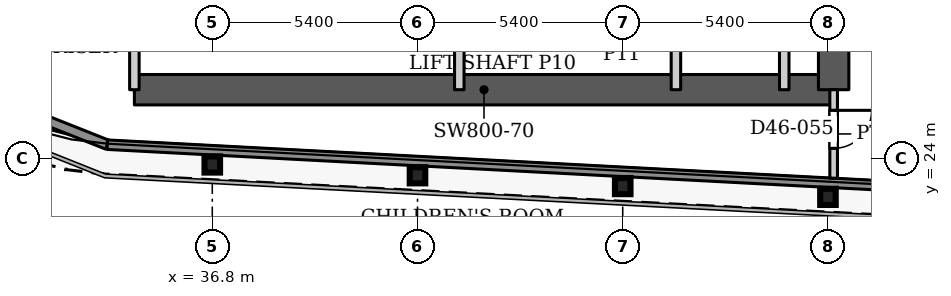
"""IFC4 building model, lengths in metres.
Left out: names, types, materials, properties, quantities, classifications, styles, units other than length and angle.
Written with IfcOpenShell. Run it as: python <this file> out.ifc"""

import sys

from ifc_helpers import new_model, si_unit, direction, frame, frame_2d, origin, origin_2d, place, context, subcontext, project, spatial, rectangle, i_section, extrude, source, transform, mapped, element, fill, save


model = new_model("IFC4")
c1 = context("Model", 3, precision=1e-05, world=origin(), true_north=direction((0.0, 1.0)))
c2 = subcontext(c1, "Body", "Model", "MODEL_VIEW")
j1 = project(units=[si_unit("LENGTHUNIT", "METRE"), si_unit("PLANEANGLEUNIT", "RADIAN")], contexts=[c1])
p1 = place(None, origin())
s1 = spatial("IfcSite", under=j1, at=p1, CompositionType="ELEMENT")
p2 = place(p1, origin())
s2 = spatial("IfcBuilding", under=s1, at=p2, CompositionType="ELEMENT")
p3 = place(p2, frame((0.0, 0.0, 195.5)))
s3 = spatial("IfcBuildingStorey", under=s2, at=p3, CompositionType="ELEMENT", Elevation=195.5)
for number, where, z_axis, x_axis in (
    (1, (53.0, 22.98, 0.0), (0.0, 0.0, 1.0), (1.0, 0.0, 0.0)),
    (2, (47.6, 23.264, 0.0), (0.0, 0.0, 1.0), (1.0, 0.0, 0.0)),
    (3, (42.2, 23.548, 0.0), (0.0, 0.0, 1.0), (1.0, 0.0, 0.0)),
    (4, (36.8, 23.832, 0.0), (0.0, 0.0, 1.0), (1.0, 0.0, 0.0)),
):
    element("IfcColumn", number, at=place(p3, frame(where, z_axis=z_axis, x_axis=x_axis)), inside=s3, PredefinedType="COLUMN", context=c2, shape_type="SweptSolid", body=[
        extrude(i_section(OverallWidth=0.409, OverallDepth=0.425, WebThickness=0.033, FlangeThickness=0.052, FilletRadius=0.013, at=origin_2d()), origin(), (0.0, 0.0, 1.0), 3.9),
    ])
p4 = place(p3, frame((34.75, 25.8, 0.0), z_axis=(0.0, 0.0, 1.0), x_axis=(1.0, 0.0, 0.0)))
e5 = element("IfcWall", 5, at=p4, inside=s3, PredefinedType="SHEAR", context=c2, shape_type="SweptSolid", body=[
    extrude(rectangle(XDim=18.4, YDim=0.8, at=frame_2d((9.2, 0.0))), origin(), (0.0, 0.0, 1.0), 3.9),
])
p5 = place(p3, frame((53.15, 25.8, 0.0), z_axis=(0.0, 0.0, 1.0), x_axis=(0.0, 1.0, 0.0)))
e6 = element("IfcWall", 6, at=p5, inside=s3, PredefinedType="SHEAR", context=c2, shape_type="SweptSolid", body=[
    extrude(rectangle(XDim=10.4, YDim=0.8, at=frame_2d((5.2, 0.0))), origin(), (0.0, 0.0, 1.0), 3.9),
])
p6 = place(p3, frame((34.039, 24.353, 0.0), z_axis=(0.0, 0.0, 1.0), x_axis=(-0.929352825399, 0.369192803184, 0.0)))
e7 = element("IfcWall", 7, at=p6, inside=s3, PredefinedType="SOLIDWALL", context=c2, shape_type="SweptSolid", body=[
    extrude(rectangle(XDim=4.656, YDim=0.25, at=frame_2d((2.328, 0.0))), origin(), (0.0, 0.0, 1.0), 3.75),
])
p7 = place(p3, frame((100.586, 20.85, 0.0), z_axis=(0.0, 0.0, 1.0), x_axis=(-0.99861746497, 0.052565755559, 0.0)))
e8 = element("IfcWall", 8, at=p7, inside=s3, PredefinedType="SOLIDWALL", context=c2, shape_type="SweptSolid", body=[
    extrude(rectangle(XDim=66.639, YDim=0.25, at=frame_2d((33.319, 0.0))), origin(), (0.0, 0.0, 1.0), 3.75),
])
for number, where, z_axis, x_axis in (
    (9, (34.75, 25.8, 0.0), (0.0, 0.0, 1.0), (0.0, 1.0, 0.0)),
    (10, (43.3, 25.8, 0.0), (0.0, 0.0, 1.0), (0.0, 1.0, 0.0)),
    (11, (49.0, 25.8, 0.0), (0.0, 0.0, 1.0), (0.0, 1.0, 0.0)),
    (12, (51.85, 25.8, 0.0), (0.0, 0.0, 1.0), (0.0, 1.0, 0.0)),
):
    element("IfcWall", number, at=place(p3, frame(where, z_axis=z_axis, x_axis=x_axis)), inside=s3, PredefinedType="PARTITIONING", context=c2, shape_type="SweptSolid", body=[
        extrude(rectangle(XDim=3.25, YDim=0.25, at=frame_2d((1.625, 0.0))), origin(), (0.0, 0.0, 1.0), 3.9),
    ])
p8 = place(p3, frame((53.15, 23.472, 0.0), z_axis=(0.0, 0.0, 1.0), x_axis=(0.0, 1.0, 0.0)))
e13 = element("IfcWall", 13, at=p8, inside=s3, PredefinedType="PARTITIONING", context=c2, shape_type="SweptSolid", body=[
    extrude(rectangle(XDim=2.328, YDim=0.2, at=frame_2d((1.164, 0.0))), origin(), (0.0, 0.0, 1.0), 3.6),
])
p9 = place(p8, frame((0.785, 0.0, 0.0)))
e14 = element("IfcOpeningElement", 14, at=p9, cuts=e13, PredefinedType="OPENING", context=c2, shape_type="SweptSolid", body=[
    extrude(rectangle(XDim=1.0, YDim=2.1, at=frame_2d((0.5, 1.05))), frame((0.0, 0.11, 0.0), z_axis=(0.0, -1.0, 0.0), x_axis=(1.0, 0.0, 0.0)), (0.0, 0.0, 1.0), 0.22),
])
m1 = source(origin(), c2, "Body", "SweptSolid", [
    extrude(rectangle(XDim=1.0, YDim=2.1, at=frame_2d((0.5, 1.05))), frame((0.0, 0.025, 0.0), z_axis=(0.0, -1.0, 0.0), x_axis=(1.0, 0.0, 0.0)), (0.0, 0.0, 1.0), 0.05),
])
p10 = place(p9, origin())
e15 = element("IfcDoor", 15, at=p10, inside=s3, OperationType="SINGLE_SWING_RIGHT", PredefinedType="DOOR", context=c2, shape_type="MappedRepresentation", body=[
    mapped(m1, transform((0.0, 0.0, 0.0), x_axis=(1.0, 0.0, 0.0), y_axis=(0.0, 1.0, 0.0), z_axis=(0.0, 0.0, 1.0), scale=1.0)),
])
fill(e14, e15)
save(model, sys.argv[1])
